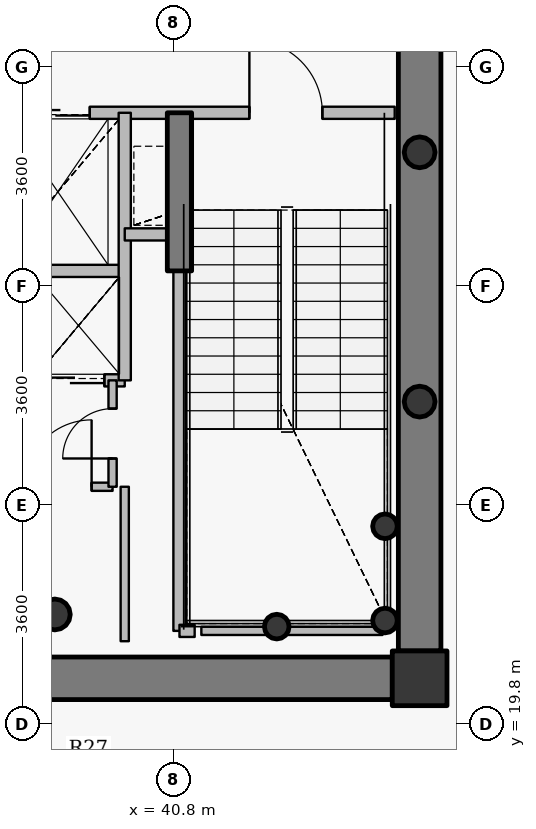
"""IFC4 building model, lengths in metres.
Left out: names, types, materials, properties, quantities, classifications, styles, units other than length and angle.
Written with IfcOpenShell. Run it as: python <this file> out.ifc"""

import sys

from ifc_helpers import new_model, si_unit, direction, frame, frame_2d, origin, origin_2d, place, context, subcontext, project, spatial, rectangle, hollow_circle, extrude, source, transform, mapped, element, fill, save


model = new_model("IFC4")
c1 = context("Model", 3, precision=1e-05, world=origin(), true_north=direction((0.0, 1.0)))
c2 = subcontext(c1, "Body", "Model", "MODEL_VIEW")
j1 = project(units=[si_unit("LENGTHUNIT", "METRE"), si_unit("PLANEANGLEUNIT", "RADIAN")], contexts=[c1])
p1 = place(None, origin())
s1 = spatial("IfcSite", under=j1, at=p1, CompositionType="ELEMENT")
p2 = place(p1, origin())
s2 = spatial("IfcBuilding", under=s1, at=p2, CompositionType="ELEMENT")
p3 = place(p2, frame((0.0, 0.0, 331.6)))
s3 = spatial("IfcBuildingStorey", under=s2, at=p3, CompositionType="ELEMENT", Elevation=331.6)
p4 = place(p3, frame((44.85, 20.55, 0.0), z_axis=(0.0, 0.0, 1.0), x_axis=(1.0, 0.0, 0.0)))
e1 = element("IfcColumn", 1, at=p4, inside=s3, PredefinedType="COLUMN", context=c2, shape_type="SweptSolid", body=[
    extrude(rectangle(XDim=0.9, YDim=0.9, at=origin_2d()), origin(), (0.0, 0.0, 1.0), 3.8),
])
p5 = place(p3, frame((38.85, 21.6, 0.0), z_axis=(0.0, 0.0, 1.0), x_axis=(1.0, 0.0, 0.0)))
e2 = element("IfcColumn", 2, at=p5, inside=s3, PredefinedType="COLUMN", context=c2, shape_type="SweptSolid", body=[
    extrude(hollow_circle(Radius=0.254, WallThickness=0.02, at=origin_2d()), origin(), (0.0, 0.0, 1.0), 3.8),
])
for number, where, z_axis, x_axis in (
    (3, (44.28, 21.5, 0.0), (0.0, 0.0, 1.0), (1.0, 0.0, 0.0)),
    (4, (44.28, 23.05, 0.0), (0.0, 0.0, 1.0), (1.0, 0.0, 0.0)),
    (5, (42.5, 21.4, 0.0), (0.0, 0.0, 1.0), (1.0, 0.0, 0.0)),
):
    element("IfcColumn", number, at=place(p3, frame(where, z_axis=z_axis, x_axis=x_axis)), inside=s3, PredefinedType="COLUMN", context=c2, shape_type="SweptSolid", body=[
        extrude(hollow_circle(Radius=0.203, WallThickness=0.016, at=origin_2d()), origin(), (0.0, 0.0, 1.0), 3.8),
    ])
p6 = place(p3, frame((44.85, 33.0, 0.0), z_axis=(0.0, 0.0, 1.0), x_axis=(0.0, -1.0, 0.0)))
e6 = element("IfcWall", 6, at=p6, inside=s3, PredefinedType="SHEAR", context=c2, shape_type="SweptSolid", body=[
    extrude(rectangle(XDim=12.0, YDim=0.7, at=frame_2d((6.0, 0.0))), origin(), (0.0, 0.0, 1.0), 3.1),
])
p7 = place(p3, frame((44.4, 20.55, 0.0), z_axis=(0.0, 0.0, 1.0), x_axis=(-1.0, 0.0, 0.0)))
e7 = element("IfcWall", 7, at=p7, inside=s3, PredefinedType="SHEAR", context=c2, shape_type="SweptSolid", body=[
    extrude(rectangle(XDim=16.8, YDim=0.7, at=frame_2d((8.4, 0.0))), origin(), (0.0, 0.0, 1.0), 3.1),
])
p8 = place(p7, frame((13.0, 0.0, 0.0)))
e8 = element("IfcOpeningElement", 8, at=p8, cuts=e7, PredefinedType="OPENING", context=c2, shape_type="SweptSolid", body=[
    extrude(rectangle(XDim=1.15, YDim=2.15, at=origin_2d()), frame((0.575, 0.36, 1.075), z_axis=(0.0, -1.0, 0.0), x_axis=(1.0, 0.0, 0.0)), (0.0, 0.0, 1.0), 0.72),
])
p9 = place(p7, frame((9.15, 0.0, 0.0)))
e9 = element("IfcOpeningElement", 9, at=p9, cuts=e7, PredefinedType="OPENING", context=c2, shape_type="SweptSolid", body=[
    extrude(rectangle(XDim=1.15, YDim=2.15, at=origin_2d()), frame((0.575, 0.36, 1.075), z_axis=(0.0, -1.0, 0.0), x_axis=(1.0, 0.0, 0.0)), (0.0, 0.0, 1.0), 0.72),
])
p10 = place(p3, frame((40.9, 27.25, 0.0), z_axis=(0.0, 0.0, 1.0), x_axis=(0.0, 1.0, 0.0)))
e10 = element("IfcWall", 10, at=p10, inside=s3, PredefinedType="SHEAR", context=c2, shape_type="SweptSolid", body=[
    extrude(rectangle(XDim=2.6, YDim=0.4, at=frame_2d((1.3, 0.0))), origin(), (0.0, 0.0, 1.0), 3.15),
])
for number, where, z_axis, x_axis in (
    (11, (44.85, 25.1, 0.0), (0.0, 0.0, 1.0), (1.0, 0.0, 0.0)),
    (12, (44.85, 29.2, 0.0), (0.0, 0.0, 1.0), (1.0, 0.0, 0.0)),
):
    element("IfcColumn", number, at=place(p3, frame(where, z_axis=z_axis, x_axis=x_axis)), inside=s3, PredefinedType="COLUMN", context=c2, shape_type="SweptSolid", body=[
        extrude(hollow_circle(Radius=0.254, WallThickness=0.02, at=origin_2d()), origin(), (0.0, 0.0, 1.0), 3.8),
    ])
p11 = place(p3, frame((35.05, 27.25, 0.0), z_axis=(0.0, 0.0, 1.0), x_axis=(1.0, 0.0, 0.0)))
e13 = element("IfcWall", 13, at=p11, inside=s3, PredefinedType="PARTITIONING", context=c2, shape_type="SweptSolid", body=[
    extrude(rectangle(XDim=4.95, YDim=0.2, at=frame_2d((2.475, 0.0))), origin(), (0.0, 0.0, 1.0), 3.135),
])
p12 = place(p3, frame((35.45, 23.7, 0.0), z_axis=(0.0, 0.0, 1.0), x_axis=(1.0, 0.0, 0.0)))
e14 = element("IfcWall", 14, at=p12, inside=s3, PredefinedType="PARTITIONING", context=c2, shape_type="SweptSolid", body=[
    extrude(rectangle(XDim=4.35, YDim=0.135, at=frame_2d((2.175, 0.0))), origin(), (0.0, 0.0, 1.0), 3.135),
])
p13 = place(p12, frame((2.905, 0.0, 0.0)))
e15 = element("IfcOpeningElement", 15, at=p13, cuts=e14, PredefinedType="OPENING", context=c2, shape_type="SweptSolid", body=[
    extrude(rectangle(XDim=1.1, YDim=2.15, at=origin_2d()), frame((0.55, 0.078, 1.075), z_axis=(0.0, -1.0, 0.0), x_axis=(1.0, 0.0, 0.0)), (0.0, 0.0, 1.0), 0.155),
])
p14 = place(p3, frame((35.45, 25.45, 0.0), z_axis=(0.0, 0.0, 1.0), x_axis=(1.0, 0.0, 0.0)))
e16 = element("IfcWall", 16, at=p14, inside=s3, PredefinedType="PARTITIONING", context=c2, shape_type="SweptSolid", body=[
    extrude(rectangle(XDim=4.55, YDim=0.2, at=frame_2d((2.275, 0.0))), origin(), (0.0, 0.0, 1.0), 3.135),
])
p15 = place(p14, frame((0.25, 0.0, 0.0)))
e17 = element("IfcOpeningElement", 17, at=p15, cuts=e16, PredefinedType="OPENING", context=c2, shape_type="SweptSolid", body=[
    extrude(rectangle(XDim=1.05, YDim=2.15, at=origin_2d()), frame((0.525, 0.11, 1.075), z_axis=(0.0, -1.0, 0.0), x_axis=(1.0, 0.0, 0.0)), (0.0, 0.0, 1.0), 0.22),
])
p16 = place(p14, frame((1.745, 0.0, 0.0)))
e18 = element("IfcOpeningElement", 18, at=p16, cuts=e16, PredefinedType="OPENING", context=c2, shape_type="SweptSolid", body=[
    extrude(rectangle(XDim=1.05, YDim=2.15, at=origin_2d()), frame((0.525, 0.11, 1.075), z_axis=(0.0, -1.0, 0.0), x_axis=(1.0, 0.0, 0.0)), (0.0, 0.0, 1.0), 0.22),
])
p17 = place(p14, frame((3.165, 0.0, 0.0)))
e19 = element("IfcOpeningElement", 19, at=p17, cuts=e16, PredefinedType="OPENING", context=c2, shape_type="SweptSolid", body=[
    extrude(rectangle(XDim=1.05, YDim=2.15, at=origin_2d()), frame((0.525, 0.11, 1.075), z_axis=(0.0, -1.0, 0.0), x_axis=(1.0, 0.0, 0.0)), (0.0, 0.0, 1.0), 0.22),
])
p18 = place(p3, frame((35.95, 29.85, 0.0), z_axis=(0.0, 0.0, 1.0), x_axis=(1.0, 0.0, 0.0)))
e20 = element("IfcWall", 20, at=p18, inside=s3, PredefinedType="PARTITIONING", context=c2, shape_type="SweptSolid", body=[
    extrude(rectangle(XDim=8.49, YDim=0.2, at=frame_2d((4.245, 0.0))), origin(), (0.0, 0.0, 1.0), 3.135),
])
p19 = place(p18, frame((6.1, 0.0, 0.0)))
e21 = element("IfcOpeningElement", 21, at=p19, cuts=e20, PredefinedType="OPENING", context=c2, shape_type="SweptSolid", body=[
    extrude(rectangle(XDim=1.2, YDim=2.15, at=origin_2d()), frame((0.6, 0.11, 1.075), z_axis=(0.0, -1.0, 0.0), x_axis=(1.0, 0.0, 0.0)), (0.0, 0.0, 1.0), 0.22),
])
p20 = place(p18, frame((0.37, 0.0, 0.0)))
e22 = element("IfcOpeningElement", 22, at=p20, cuts=e20, PredefinedType="OPENING", context=c2, shape_type="SweptSolid", body=[
    extrude(rectangle(XDim=1.15, YDim=2.15, at=origin_2d()), frame((0.575, 0.11, 1.075), z_axis=(0.0, -1.0, 0.0), x_axis=(1.0, 0.0, 0.0)), (0.0, 0.0, 1.0), 0.22),
])
p21 = place(p18, frame((2.425, 0.0, 0.0)))
e23 = element("IfcOpeningElement", 23, at=p21, cuts=e20, PredefinedType="OPENING", context=c2, shape_type="SweptSolid", body=[
    extrude(rectangle(XDim=1.05, YDim=2.15, at=origin_2d()), frame((0.525, 0.11, 1.075), z_axis=(0.0, -1.0, 0.0), x_axis=(1.0, 0.0, 0.0)), (0.0, 0.0, 1.0), 0.22),
])
p22 = place(p3, frame((39.8, 23.7, 0.0), z_axis=(0.0, 0.0, 1.0), x_axis=(0.0, 1.0, 0.0)))
e24 = element("IfcWall", 24, at=p22, inside=s3, PredefinedType="PARTITIONING", context=c2, shape_type="SweptSolid", body=[
    extrude(rectangle(XDim=1.75, YDim=0.135, at=frame_2d((0.875, 0.0))), origin(), (0.0, 0.0, 1.0), 3.55),
])
p23 = place(p22, frame((0.465, 0.0, 0.0)))
e25 = element("IfcOpeningElement", 25, at=p23, cuts=e24, PredefinedType="OPENING", context=c2, shape_type="SweptSolid", body=[
    extrude(rectangle(XDim=0.82, YDim=2.1, at=origin_2d()), frame((0.41, 0.078, 1.05), z_axis=(0.0, -1.0, 0.0), x_axis=(1.0, 0.0, 0.0)), (0.0, 0.0, 1.0), 0.155),
])
p24 = place(p3, frame((40.0, 25.45, 0.0), z_axis=(0.0, 0.0, 1.0), x_axis=(0.0, 1.0, 0.0)))
e26 = element("IfcWall", 26, at=p24, inside=s3, PredefinedType="PARTITIONING", context=c2, shape_type="SweptSolid", body=[
    extrude(rectangle(XDim=4.4, YDim=0.2, at=frame_2d((2.2, 0.0))), origin(), (0.0, 0.0, 1.0), 3.55),
])
p25 = place(p3, frame((40.0, 27.85, 0.0), z_axis=(0.0, 0.0, 1.0), x_axis=(1.0, 0.0, 0.0)))
e27 = element("IfcWall", 27, at=p25, inside=s3, PredefinedType="PARTITIONING", context=c2, shape_type="SweptSolid", body=[
    extrude(rectangle(XDim=0.9, YDim=0.2, at=frame_2d((0.45, 0.0))), origin(), (0.0, 0.0, 1.0), 3.55),
])
p26 = place(p3, frame((40.9, 21.33, 0.0), z_axis=(0.0, 0.0, 1.0), x_axis=(0.0, 1.0, 0.0)))
e28 = element("IfcWall", 28, at=p26, inside=s3, PredefinedType="PARTITIONING", context=c2, shape_type="SweptSolid", body=[
    extrude(rectangle(XDim=5.91, YDim=0.2, at=frame_2d((2.955, 0.0))), origin(), (0.0, 0.0, 1.0), 3.085),
])
p27 = place(p3, frame((40.9, 21.33, 0.0), z_axis=(0.0, 0.0, 1.0), x_axis=(1.0, 0.0, 0.0)))
e29 = element("IfcWall", 29, at=p27, inside=s3, PredefinedType="PARTITIONING", context=c2, shape_type="SweptSolid", body=[
    extrude(rectangle(XDim=0.25, YDim=0.2, at=frame_2d((0.125, 0.0))), origin(), (0.0, 0.0, 1.0), 3.085),
])
p28 = place(p3, frame((44.24, 21.33, 0.0), z_axis=(0.0, 0.0, 1.0), x_axis=(-1.0, 0.0, 0.0)))
e30 = element("IfcWall", 30, at=p28, inside=s3, PredefinedType="PARTITIONING", context=c2, shape_type="SweptSolid", body=[
    extrude(rectangle(XDim=2.98, YDim=0.135, at=frame_2d((1.49, 0.0))), origin(), (0.0, 0.0, 1.0), 3.085),
])
p29 = place(p3, frame((40.0, 23.7, 0.0), z_axis=(0.0, 0.0, 1.0), x_axis=(0.0, -1.0, 0.0)))
e31 = element("IfcWall", 31, at=p29, inside=s3, PredefinedType="PARTITIONING", context=c2, shape_type="SweptSolid", body=[
    extrude(rectangle(XDim=2.54, YDim=0.135, at=frame_2d((1.27, 0.0))), origin(), (0.0, 0.0, 1.0), 3.085),
])
p30 = place(p3, frame((44.41, 20.2, 0.0), z_axis=(0.0, 0.0, 1.0), x_axis=(1.0, 0.0, 0.0)))
e32 = element("IfcWall", 32, at=p30, inside=s3, PredefinedType="PARTITIONING", context=c2, shape_type="SweptSolid", body=[
    extrude(rectangle(XDim=0.79, YDim=0.135, at=frame_2d((0.395, 0.0))), origin(), (0.0, 0.0, 1.0), 3.085),
])
p31 = place(p3, frame((45.2, 20.508, 0.0), z_axis=(0.0, 0.0, 1.0), x_axis=(0.0, 1.0, 0.0)))
e33 = element("IfcWall", 33, at=p31, inside=s3, PredefinedType="PARTITIONING", context=c2, shape_type="SweptSolid", body=[
    extrude(rectangle(XDim=0.482, YDim=0.135, at=frame_2d((0.241, 0.0))), origin(), (0.0, 0.0, 1.0), 3.55),
])
m1 = source(origin(), c2, "Body", "SweptSolid", [
    extrude(rectangle(XDim=1.2, YDim=2.15, at=origin_2d()), frame((0.6, 0.025, 1.075), z_axis=(0.0, -1.0, 0.0), x_axis=(1.0, 0.0, 0.0)), (0.0, 0.0, 1.0), 0.05),
])
p32 = place(p19, origin())
e34 = element("IfcDoor", 34, at=p32, inside=s3, OperationType="SINGLE_SWING_LEFT", PredefinedType="DOOR", context=c2, shape_type="MappedRepresentation", body=[
    mapped(m1, transform((0.0, 0.0, 0.0), x_axis=(1.0, 0.0, 0.0), y_axis=(0.0, 1.0, 0.0), z_axis=(0.0, 0.0, 1.0), scale=1.0)),
])
fill(e21, e34)
m2 = source(origin(), c2, "Body", "SweptSolid", [
    extrude(rectangle(XDim=1.05, YDim=2.15, at=origin_2d()), frame((0.525, 0.025, 1.075), z_axis=(0.0, -1.0, 0.0), x_axis=(1.0, 0.0, 0.0)), (0.0, 0.0, 1.0), 0.05),
])
p33 = place(p21, origin())
e35 = element("IfcDoor", 35, at=p33, inside=s3, OperationType="DOUBLE_DOOR_SLIDING", PredefinedType="USERDEFINED", context=c2, shape_type="MappedRepresentation", body=[
    mapped(m2, transform((0.0, 0.0, 0.0), x_axis=(1.0, 0.0, 0.0), y_axis=(0.0, 1.0, 0.0), z_axis=(0.0, 0.0, 1.0), scale=1.0)),
])
fill(e23, e35)
p34 = place(p17, origin())
e36 = element("IfcDoor", 36, at=p34, inside=s3, OperationType="DOUBLE_DOOR_SLIDING", PredefinedType="USERDEFINED", context=c2, shape_type="MappedRepresentation", body=[
    mapped(m2, transform((0.0, 0.0, 0.0), x_axis=(1.0, 0.0, 0.0), y_axis=(0.0, 1.0, 0.0), z_axis=(0.0, 0.0, 1.0), scale=1.0)),
])
fill(e19, e36)
m3 = source(origin(), c2, "Body", "SweptSolid", [
    extrude(rectangle(XDim=1.1, YDim=2.15, at=origin_2d()), frame((0.55, 0.025, 1.075), z_axis=(0.0, -1.0, 0.0), x_axis=(1.0, 0.0, 0.0)), (0.0, 0.0, 1.0), 0.05),
])
p35 = place(p13, origin())
e37 = element("IfcDoor", 37, at=p35, inside=s3, OperationType="SINGLE_SWING_RIGHT", PredefinedType="DOOR", context=c2, shape_type="MappedRepresentation", body=[
    mapped(m3, transform((0.0, 0.0, 0.0), x_axis=(1.0, 0.0, 0.0), y_axis=(0.0, 1.0, 0.0), z_axis=(0.0, 0.0, 1.0), scale=1.0)),
])
fill(e15, e37)
m4 = source(origin(), c2, "Body", "SweptSolid", [
    extrude(rectangle(XDim=0.82, YDim=2.1, at=origin_2d()), frame((0.41, 0.025, 1.05), z_axis=(0.0, -1.0, 0.0), x_axis=(1.0, 0.0, 0.0)), (0.0, 0.0, 1.0), 0.05),
])
p36 = place(p23, origin())
e38 = element("IfcDoor", 38, at=p36, inside=s3, OperationType="SINGLE_SWING_LEFT", PredefinedType="DOOR", context=c2, shape_type="MappedRepresentation", body=[
    mapped(m4, transform((0.0, 0.0, 0.0), x_axis=(1.0, 0.0, 0.0), y_axis=(0.0, 1.0, 0.0), z_axis=(0.0, 0.0, 1.0), scale=1.0)),
])
fill(e25, e38)
save(model, sys.argv[1])
